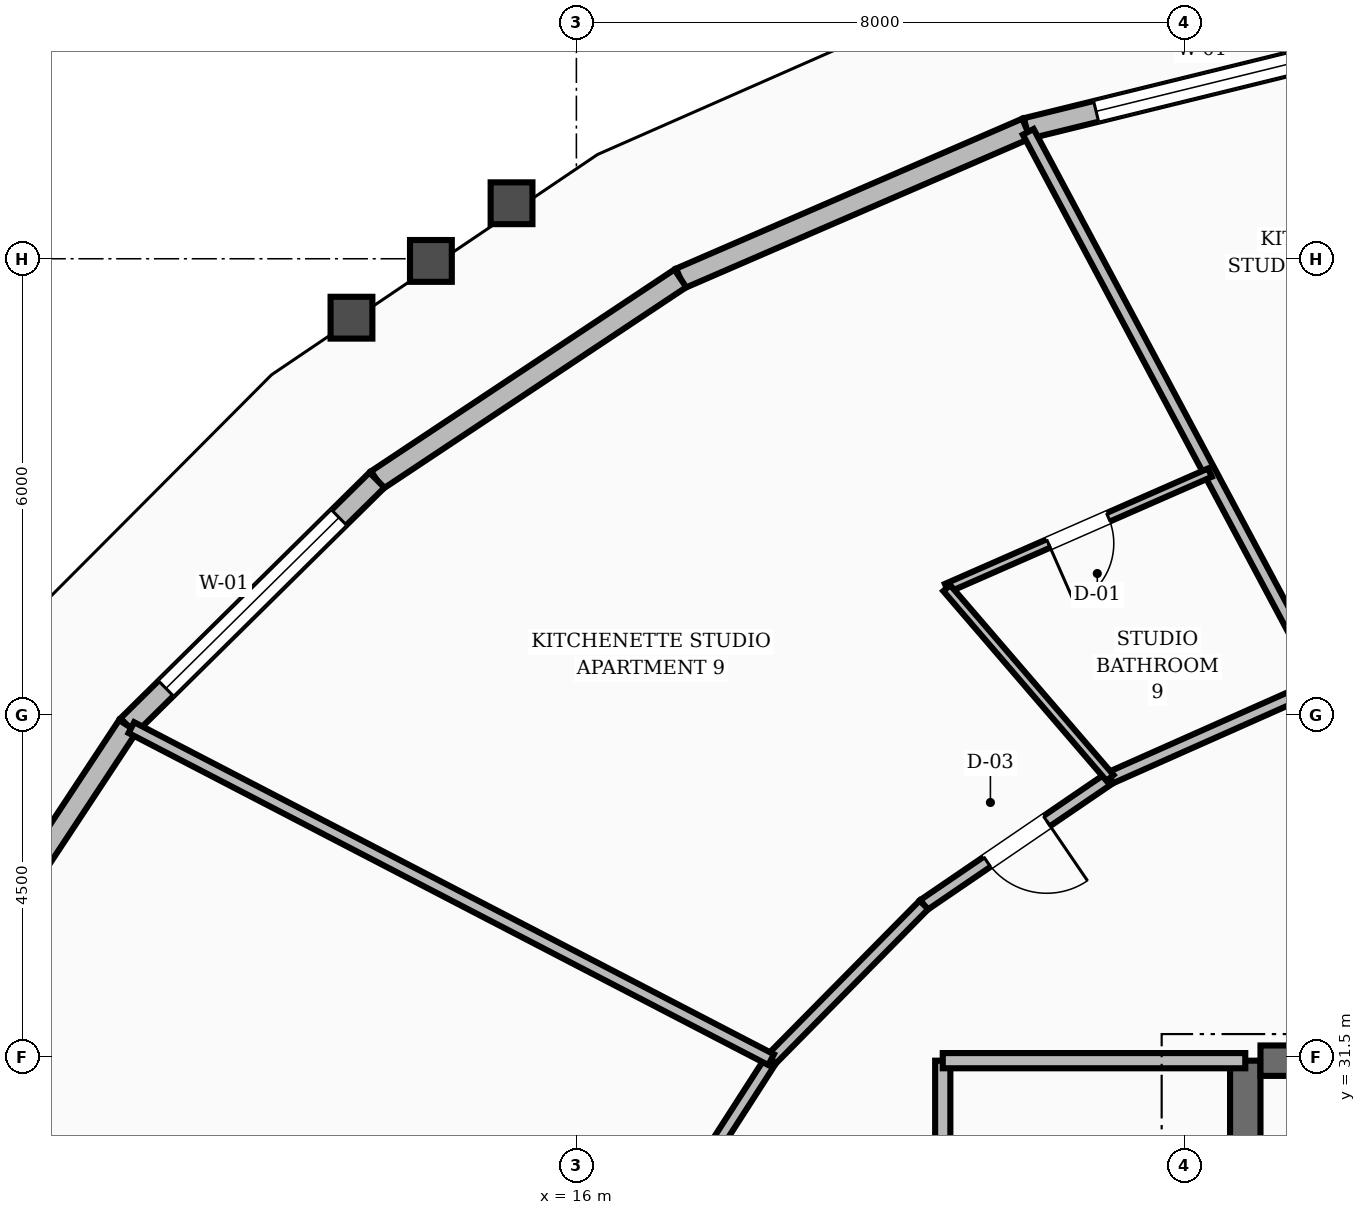
"""IFC4 building model, lengths in metres.
Left out: names, types, materials, properties, quantities, classifications, styles, units other than length and angle.
Written with IfcOpenShell. Run it as: python <this file> out.ifc"""

import sys

from ifc_helpers import new_model, si_unit, direction, frame, frame_2d, origin, place, context, subcontext, project, spatial, rectangle, extrude, element, fill, save


model = new_model("IFC4")
c1 = context("Model", 3, precision=1e-05, world=origin(), true_north=direction((0.0, 1.0)))
c2 = subcontext(c1, "Body", "Model", "MODEL_VIEW")
j1 = project(units=[si_unit("LENGTHUNIT", "METRE"), si_unit("PLANEANGLEUNIT", "RADIAN")], contexts=[c1])
p1 = place(None, origin())
s1 = spatial("IfcSite", under=j1, at=p1, CompositionType="ELEMENT")
p2 = place(p1, origin())
s2 = spatial("IfcBuilding", under=s1, at=p2, CompositionType="ELEMENT")
p3 = place(p2, frame((0.0, 0.0, 48.4)))
s3 = spatial("IfcBuildingStorey", under=s2, at=p3, CompositionType="ELEMENT", Elevation=48.4)
p4 = place(p3, frame((24.8, 25.15, 0.0), z_axis=(0.0, 0.0, 1.0), x_axis=(0.0, 1.0, 0.0)))
e1 = element("IfcWall", 1, at=p4, inside=s3, PredefinedType="SHEAR", context=c2, shape_type="SweptSolid", body=[
    extrude(rectangle(XDim=6.3, YDim=0.4, at=frame_2d((3.15, 0.0))), origin(), (0.0, 0.0, 1.0), 3.6),
])
p5 = place(p3, frame((25.0, 31.45, 0.0), z_axis=(0.0, 0.0, 1.0), x_axis=(1.0, 0.0, 0.0)))
e2 = element("IfcWall", 2, at=p5, inside=s3, PredefinedType="SHEAR", context=c2, shape_type="SweptSolid", body=[
    extrude(rectangle(XDim=3.2, YDim=0.4, at=frame_2d((1.6, 0.0))), origin(), (0.0, 0.0, 1.0), 3.6),
])
p6 = place(p3, frame((26.862, 44.928, 0.0), z_axis=(0.0, 0.0, 1.0), x_axis=(-0.971100140987, -0.238672403462, 0.0)))
e3 = element("IfcWall", 3, at=p6, inside=s3, PredefinedType="STANDARD", context=c2, shape_type="SweptSolid", body=[
    extrude(rectangle(XDim=5.088, YDim=0.28, at=frame_2d((2.544, 0.0))), origin(), (0.0, 0.0, 1.0), 2.65),
])
p7 = place(p6, frame((0.944, 0.0, 0.8)))
e4 = element("IfcOpeningElement", 4, at=p7, cuts=e3, PredefinedType="OPENING", context=c2, shape_type="SweptSolid", body=[
    extrude(rectangle(XDim=3.2, YDim=1.65, at=frame_2d((1.6, 0.825))), frame((0.0, 0.15, 0.0), z_axis=(0.0, -1.0, 0.0), x_axis=(1.0, 0.0, 0.0)), (0.0, 0.0, 1.0), 0.3),
])
p8 = place(p3, frame((21.921, 43.714, 0.0), z_axis=(0.0, 0.0, 1.0), x_axis=(-0.917665086661, -0.397354739149, 0.0)))
e5 = element("IfcWall", 5, at=p8, inside=s3, PredefinedType="STANDARD", context=c2, shape_type="SweptSolid", body=[
    extrude(rectangle(XDim=4.962, YDim=0.28, at=frame_2d((2.481, 0.0))), origin(), (0.0, 0.0, 1.0), 2.65),
])
p9 = place(p3, frame((17.367, 41.742, 0.0), z_axis=(0.0, 0.0, 1.0), x_axis=(-0.832723620408, -0.55368887655, 0.0)))
e6 = element("IfcWall", 6, at=p9, inside=s3, PredefinedType="STANDARD", context=c2, shape_type="SweptSolid", body=[
    extrude(rectangle(XDim=4.793, YDim=0.28, at=frame_2d((2.396, 0.0))), origin(), (0.0, 0.0, 1.0), 2.65),
])
p10 = place(p3, frame((13.376, 39.088, 0.0), z_axis=(0.0, 0.0, 1.0), x_axis=(-0.711653949878, -0.70253018129, 0.0)))
e7 = element("IfcWall", 7, at=p10, inside=s3, PredefinedType="STANDARD", context=c2, shape_type="SweptSolid", body=[
    extrude(rectangle(XDim=4.603, YDim=0.28, at=frame_2d((2.301, 0.0))), origin(), (0.0, 0.0, 1.0), 2.65),
])
p11 = place(p10, frame((0.701, 0.0, 0.8)))
e8 = element("IfcOpeningElement", 8, at=p11, cuts=e7, PredefinedType="OPENING", context=c2, shape_type="SweptSolid", body=[
    extrude(rectangle(XDim=3.2, YDim=1.65, at=frame_2d((1.6, 0.825))), frame((0.0, 0.15, 0.0), z_axis=(0.0, -1.0, 0.0), x_axis=(1.0, 0.0, 0.0)), (0.0, 0.0, 1.0), 0.3),
])
p12 = place(p3, frame((10.101, 35.855, 0.0), z_axis=(0.0, 0.0, 1.0), x_axis=(-0.550703673424, -0.834700823096, 0.0)))
e9 = element("IfcWall", 9, at=p12, inside=s3, PredefinedType="STANDARD", context=c2, shape_type="SweptSolid", body=[
    extrude(rectangle(XDim=4.419, YDim=0.28, at=frame_2d((2.21, 0.0))), origin(), (0.0, 0.0, 1.0), 2.65),
])
p13 = place(p3, frame((20.82, 28.32, 0.0), z_axis=(0.0, 0.0, 1.0), x_axis=(0.0, 1.0, 0.0)))
e10 = element("IfcWall", 10, at=p13, inside=s3, PredefinedType="SOLIDWALL", context=c2, shape_type="SweptSolid", body=[
    extrude(rectangle(XDim=3.13, YDim=0.2, at=frame_2d((1.565, 0.0))), origin(), (0.0, 0.0, 1.0), 2.61),
])
p14 = place(p13, frame((1.09, 0.0, 0.0)))
e11 = element("IfcOpeningElement", 11, at=p14, cuts=e10, PredefinedType="OPENING", context=c2, shape_type="SweptSolid", body=[
    extrude(rectangle(XDim=0.95, YDim=2.1, at=frame_2d((0.475, 1.05))), frame((0.0, 0.11, 0.0), z_axis=(0.0, -1.0, 0.0), x_axis=(1.0, 0.0, 0.0)), (0.0, 0.0, 1.0), 0.22),
])
p15 = place(p3, frame((20.82, 31.45, 0.0), z_axis=(0.0, 0.0, 1.0), x_axis=(1.0, 0.0, 0.0)))
e12 = element("IfcWall", 12, at=p15, inside=s3, PredefinedType="SOLIDWALL", context=c2, shape_type="SweptSolid", body=[
    extrude(rectangle(XDim=3.98, YDim=0.2, at=frame_2d((1.99, 0.0))), origin(), (0.0, 0.0, 1.0), 2.61),
])
p16 = place(p3, frame((25.815, 36.411, 0.0), z_axis=(0.0, 0.0, 1.0), x_axis=(-0.913860932409, -0.406027334321, 0.0)))
e13 = element("IfcWall", 13, at=p16, inside=s3, PredefinedType="SOLIDWALL", context=c2, shape_type="SweptSolid", body=[
    extrude(rectangle(XDim=3.058, YDim=0.16, at=frame_2d((1.529, 0.0))), origin(), (0.0, 0.0, 1.0), 2.61),
])
p17 = place(p3, frame((23.021, 35.17, 0.0), z_axis=(0.0, 0.0, 1.0), x_axis=(-0.826112340767, -0.563505457323, 0.0)))
e14 = element("IfcWall", 14, at=p17, inside=s3, PredefinedType="SOLIDWALL", context=c2, shape_type="SweptSolid", body=[
    extrude(rectangle(XDim=2.965, YDim=0.16, at=frame_2d((1.482, 0.0))), origin(), (0.0, 0.0, 1.0), 2.61),
])
p18 = place(p17, frame((1.007, 0.0, 0.0)))
e15 = element("IfcOpeningElement", 15, at=p18, cuts=e14, PredefinedType="OPENING", context=c2, shape_type="SweptSolid", body=[
    extrude(rectangle(XDim=0.95, YDim=2.1, at=frame_2d((0.475, 1.05))), frame((0.0, 0.09, 0.0), z_axis=(0.0, -1.0, 0.0), x_axis=(1.0, 0.0, 0.0)), (0.0, 0.0, 1.0), 0.18),
])
p19 = place(p3, frame((20.572, 33.499, 0.0), z_axis=(0.0, 0.0, 1.0), x_axis=(-0.702569520063, -0.711615113301, 0.0)))
e16 = element("IfcWall", 16, at=p19, inside=s3, PredefinedType="SOLIDWALL", context=c2, shape_type="SweptSolid", body=[
    extrude(rectangle(XDim=2.861, YDim=0.16, at=frame_2d((1.43, 0.0))), origin(), (0.0, 0.0, 1.0), 2.61),
])
p20 = place(p3, frame((18.562, 31.463, 0.0), z_axis=(0.0, 0.0, 1.0), x_axis=(-0.540891657444, -0.841092274907, 0.0)))
e17 = element("IfcWall", 17, at=p20, inside=s3, PredefinedType="SOLIDWALL", context=c2, shape_type="SweptSolid", body=[
    extrude(rectangle(XDim=2.761, YDim=0.16, at=frame_2d((1.38, 0.0))), origin(), (0.0, 0.0, 1.0), 2.61),
])
p21 = place(p3, frame((25.815, 36.411, 0.0), z_axis=(0.0, 0.0, 1.0), x_axis=(-0.47056512842, 0.882365264454, 0.0)))
e18 = element("IfcWall", 18, at=p21, inside=s3, PredefinedType="SOLIDWALL", context=c2, shape_type="SweptSolid", body=[
    extrude(rectangle(XDim=8.226, YDim=0.16, at=frame_2d((4.113, 0.0))), origin(), (0.0, 0.0, 1.0), 2.61),
])
p22 = place(p3, frame((24.335, 39.186, 0.0), z_axis=(0.0, 0.0, 1.0), x_axis=(-0.915755288827, -0.401736544249, 0.0)))
e19 = element("IfcWall", 19, at=p22, inside=s3, PredefinedType="PARTITIONING", context=c2, shape_type="SweptSolid", body=[
    extrude(rectangle(XDim=3.781, YDim=0.12, at=frame_2d((1.891, 0.0))), origin(), (0.0, 0.0, 1.0), 2.61),
])
p23 = place(p22, frame((1.461, 0.0, 0.0)))
e20 = element("IfcOpeningElement", 20, at=p23, cuts=e19, PredefinedType="OPENING", context=c2, shape_type="SweptSolid", body=[
    extrude(rectangle(XDim=0.86, YDim=2.1, at=frame_2d((0.43, 1.05))), frame((0.0, 0.07, 0.0), z_axis=(0.0, -1.0, 0.0), x_axis=(1.0, 0.0, 0.0)), (0.0, 0.0, 1.0), 0.14),
])
p24 = place(p3, frame((23.021, 35.17, 0.0), z_axis=(0.0, 0.0, 1.0), x_axis=(-0.652169620861, 0.758073074067, 0.0)))
e21 = element("IfcWall", 21, at=p24, inside=s3, PredefinedType="PARTITIONING", context=c2, shape_type="SweptSolid", body=[
    extrude(rectangle(XDim=3.294, YDim=0.12, at=frame_2d((1.647, 0.0))), origin(), (0.0, 0.0, 1.0), 2.61),
])
p25 = place(p3, frame((18.562, 31.463, 0.0), z_axis=(0.0, 0.0, 1.0), x_axis=(-0.887569366449, 0.460674092762, 0.0)))
e22 = element("IfcWall", 22, at=p25, inside=s3, PredefinedType="SOLIDWALL", context=c2, shape_type="SweptSolid", body=[
    extrude(rectangle(XDim=9.483, YDim=0.16, at=frame_2d((4.741, 0.0))), origin(), (0.0, 0.0, 1.0), 2.61),
])
p26 = place(p7, origin())
e23 = element("IfcWindow", 23, at=p26, inside=s3, PartitioningType="SINGLE_PANEL", PredefinedType="WINDOW", context=c2, shape_type="SweptSolid", body=[
    extrude(rectangle(XDim=3.2, YDim=1.65, at=frame_2d((1.6, 0.825))), frame((0.0, 0.03, 0.0), z_axis=(0.0, -1.0, 0.0), x_axis=(1.0, 0.0, 0.0)), (0.0, 0.0, 1.0), 0.06),
])
fill(e4, e23)
p27 = place(p11, origin())
e24 = element("IfcWindow", 24, at=p27, inside=s3, PartitioningType="SINGLE_PANEL", PredefinedType="WINDOW", context=c2, shape_type="SweptSolid", body=[
    extrude(rectangle(XDim=3.2, YDim=1.65, at=frame_2d((1.6, 0.825))), frame((0.0, 0.03, 0.0), z_axis=(0.0, -1.0, 0.0), x_axis=(1.0, 0.0, 0.0)), (0.0, 0.0, 1.0), 0.06),
])
fill(e8, e24)
p28 = place(p23, origin())
e25 = element("IfcDoor", 25, at=p28, inside=s3, OperationType="SINGLE_SWING_RIGHT", PredefinedType="DOOR", context=c2, shape_type="SweptSolid", body=[
    extrude(rectangle(XDim=0.86, YDim=2.1, at=frame_2d((0.43, 1.05))), frame((0.0, 0.025, 0.0), z_axis=(0.0, -1.0, 0.0), x_axis=(1.0, 0.0, 0.0)), (0.0, 0.0, 1.0), 0.05),
])
fill(e20, e25)
p29 = place(p18, origin())
e26 = element("IfcDoor", 26, at=p29, inside=s3, OperationType="SINGLE_SWING_LEFT", PredefinedType="DOOR", context=c2, shape_type="SweptSolid", body=[
    extrude(rectangle(XDim=0.95, YDim=2.1, at=frame_2d((0.475, 1.05))), frame((0.0, 0.025, 0.0), z_axis=(0.0, -1.0, 0.0), x_axis=(1.0, 0.0, 0.0)), (0.0, 0.0, 1.0), 0.05),
])
fill(e15, e26)
save(model, sys.argv[1])
